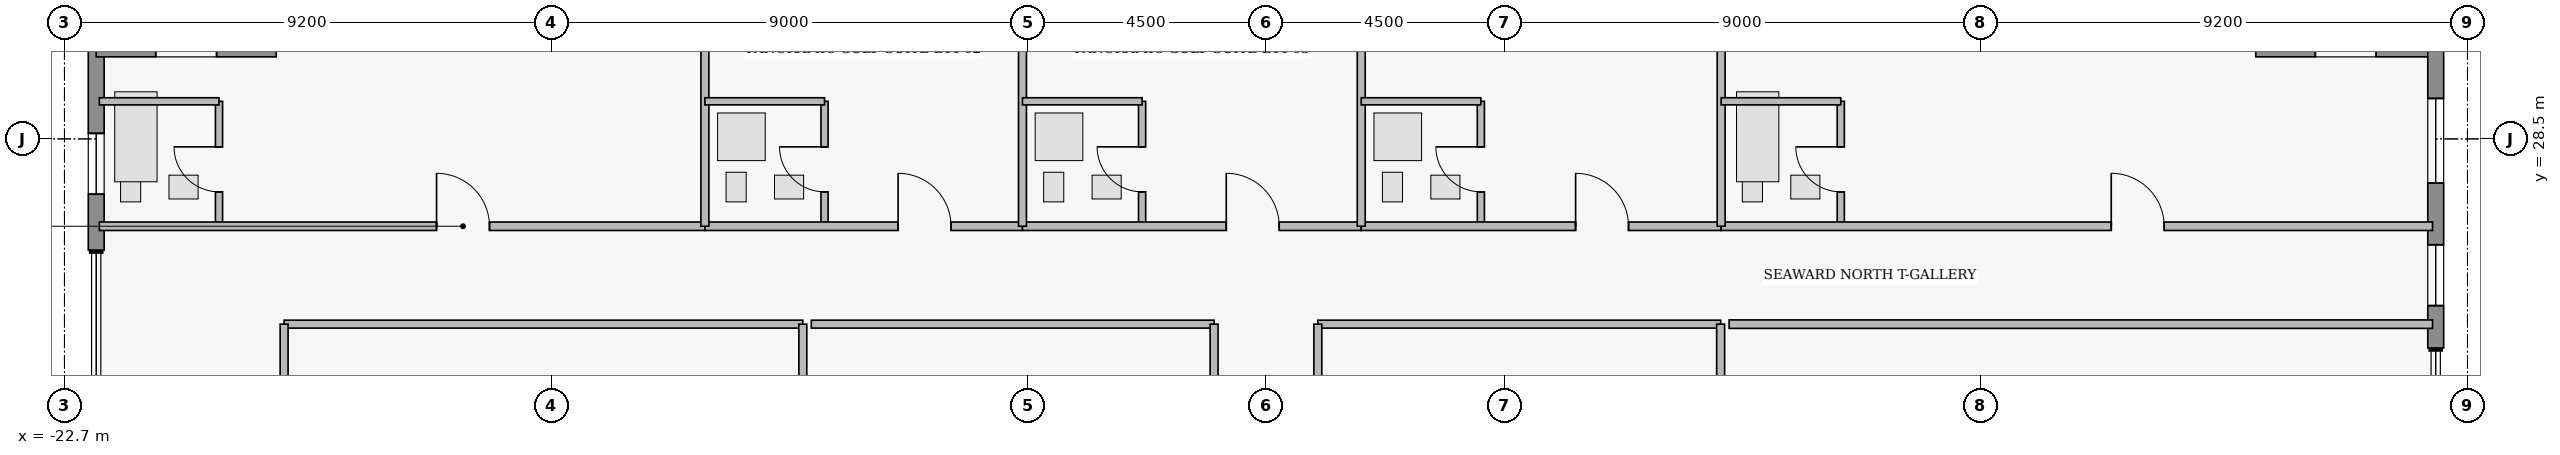
"""IFC4 building model, lengths in metres.
Left out: names, types, materials, properties, quantities, classifications, styles, units other than length and angle.
Written with IfcOpenShell. Run it as: python <this file> out.ifc"""

import sys

from ifc_helpers import new_model, si_unit, direction, frame, frame_2d, origin, place, context, subcontext, project, spatial, rectangle, extrude, element, fill, save


model = new_model("IFC4")
c1 = context("Model", 3, precision=1e-05, world=origin(), true_north=direction((0.0, 1.0)))
c2 = subcontext(c1, "Body", "Model", "MODEL_VIEW")
j1 = project(units=[si_unit("LENGTHUNIT", "METRE"), si_unit("PLANEANGLEUNIT", "RADIAN")], contexts=[c1])
p1 = place(None, origin())
s1 = spatial("IfcSite", under=j1, at=p1, CompositionType="ELEMENT")
p2 = place(p1, origin())
s2 = spatial("IfcBuilding", under=s1, at=p2, CompositionType="ELEMENT")
p3 = place(p2, frame((0.0, 0.0, 177.4)))
s3 = spatial("IfcBuildingStorey", under=s2, at=p3, CompositionType="ELEMENT", Elevation=177.4)
p4 = place(p3, frame((-22.1, 26.4, 0.0), z_axis=(0.0, 0.0, 1.0), x_axis=(0.0, 1.0, 0.0)))
e1 = element("IfcWall", 1, at=p4, inside=s3, PredefinedType="STANDARD", context=c2, shape_type="SweptSolid", body=[
    extrude(rectangle(XDim=3.8, YDim=0.3, at=frame_2d((1.9, 0.0))), origin(), (0.0, 0.0, 1.0), 3.53),
])
p5 = place(p4, frame((1.055, 0.0, 0.95)))
e2 = element("IfcOpeningElement", 2, at=p5, cuts=e1, PredefinedType="OPENING", context=c2, shape_type="SweptSolid", body=[
    extrude(rectangle(XDim=1.15, YDim=1.55, at=frame_2d((0.575, 0.775))), frame((0.0, 0.16, 0.0), z_axis=(0.0, -1.0, 0.0), x_axis=(1.0, 0.0, 0.0)), (0.0, 0.0, 1.0), 0.32),
])
p6 = place(p3, frame((-22.1, 30.2, 0.0), z_axis=(0.0, 0.0, 1.0), x_axis=(1.0, 0.0, 0.0)))
e3 = element("IfcWall", 3, at=p6, inside=s3, PredefinedType="STANDARD", context=c2, shape_type="SweptSolid", body=[
    extrude(rectangle(XDim=3.4, YDim=0.3, at=frame_2d((1.7, 0.0))), origin(), (0.0, 0.0, 1.0), 3.53),
])
p7 = place(p6, frame((1.125, 0.0, 1.25)))
e4 = element("IfcOpeningElement", 4, at=p7, cuts=e3, PredefinedType="OPENING", context=c2, shape_type="SweptSolid", body=[
    extrude(rectangle(XDim=1.15, YDim=1.55, at=frame_2d((0.575, 0.775))), frame((0.0, 0.16, 0.0), z_axis=(0.0, -1.0, 0.0), x_axis=(1.0, 0.0, 0.0)), (0.0, 0.0, 1.0), 0.32),
])
p8 = place(p3, frame((18.7, 30.2, 0.0), z_axis=(0.0, 0.0, 1.0), x_axis=(1.0, 0.0, 0.0)))
e5 = element("IfcWall", 5, at=p8, inside=s3, PredefinedType="STANDARD", context=c2, shape_type="SweptSolid", body=[
    extrude(rectangle(XDim=3.4, YDim=0.3, at=frame_2d((1.7, 0.0))), origin(), (0.0, 0.0, 1.0), 3.53),
])
p9 = place(p8, frame((1.125, 0.0, 1.25)))
e6 = element("IfcOpeningElement", 6, at=p9, cuts=e5, PredefinedType="OPENING", context=c2, shape_type="SweptSolid", body=[
    extrude(rectangle(XDim=1.15, YDim=1.55, at=frame_2d((0.575, 0.775))), frame((0.0, 0.16, 0.0), z_axis=(0.0, -1.0, 0.0), x_axis=(1.0, 0.0, 0.0)), (0.0, 0.0, 1.0), 0.32),
])
p10 = place(p3, frame((22.1, 30.2, 0.0), z_axis=(0.0, 0.0, 1.0), x_axis=(0.0, -1.0, 0.0)))
e7 = element("IfcWall", 7, at=p10, inside=s3, PredefinedType="STANDARD", context=c2, shape_type="SweptSolid", body=[
    extrude(rectangle(XDim=5.65, YDim=0.3, at=frame_2d((2.825, 0.0))), origin(), (0.0, 0.0, 1.0), 3.53),
])
p11 = place(p10, frame((0.935, 0.0, 0.85)))
e8 = element("IfcOpeningElement", 8, at=p11, cuts=e7, PredefinedType="OPENING", context=c2, shape_type="SweptSolid", body=[
    extrude(rectangle(XDim=1.6, YDim=1.8, at=frame_2d((0.8, 0.9))), frame((0.0, 0.16, 0.0), z_axis=(0.0, -1.0, 0.0), x_axis=(1.0, 0.0, 0.0)), (0.0, 0.0, 1.0), 0.32),
])
p12 = place(p10, frame((3.7, 0.0, 0.95)))
e9 = element("IfcOpeningElement", 9, at=p12, cuts=e7, PredefinedType="OPENING", context=c2, shape_type="SweptSolid", body=[
    extrude(rectangle(XDim=1.15, YDim=1.55, at=frame_2d((0.575, 0.775))), frame((0.0, 0.16, 0.0), z_axis=(0.0, -1.0, 0.0), x_axis=(1.0, 0.0, 0.0)), (0.0, 0.0, 1.0), 0.32),
])
p13 = place(p3, frame((-19.78, 26.85, 0.0), z_axis=(0.0, 0.0, 1.0), x_axis=(0.0, 1.0, 0.0)))
e10 = element("IfcWall", 10, at=p13, inside=s3, PredefinedType="PLUMBINGWALL", context=c2, shape_type="SweptSolid", body=[
    extrude(rectangle(XDim=2.36, YDim=0.135, at=frame_2d((1.18, 0.0))), origin(), (0.0, 0.0, 1.0), 3.53),
])
p14 = place(p13, frame((0.65, 0.0, 0.0)))
e11 = element("IfcOpeningElement", 11, at=p14, cuts=e10, PredefinedType="OPENING", context=c2, shape_type="SweptSolid", body=[
    extrude(rectangle(XDim=0.85, YDim=2.1, at=frame_2d((0.425, 1.05))), frame((0.0, 0.077, 0.0), z_axis=(0.0, -1.0, 0.0), x_axis=(1.0, 0.0, 0.0)), (0.0, 0.0, 1.0), 0.155),
])
p15 = place(p3, frame((-22.04, 26.85, 0.0), z_axis=(0.0, 0.0, 1.0), x_axis=(1.0, 0.0, 0.0)))
e12 = element("IfcWall", 12, at=p15, inside=s3, PredefinedType="PARTITIONING", context=c2, shape_type="SweptSolid", body=[
    extrude(rectangle(XDim=11.44, YDim=0.16, at=frame_2d((5.72, 0.0))), origin(), (0.0, 0.0, 1.0), 3.53),
])
p16 = place(p15, frame((6.37, 0.0, 0.0)))
e13 = element("IfcOpeningElement", 13, at=p16, cuts=e12, PredefinedType="OPENING", context=c2, shape_type="SweptSolid", body=[
    extrude(rectangle(XDim=1.0, YDim=2.15, at=frame_2d((0.5, 1.075))), frame((0.0, 0.09, 0.0), z_axis=(0.0, -1.0, 0.0), x_axis=(1.0, 0.0, 0.0)), (0.0, 0.0, 1.0), 0.18),
])
p17 = place(p3, frame((-8.34, 26.85, 0.0), z_axis=(0.0, 0.0, 1.0), x_axis=(0.0, 1.0, 0.0)))
e14 = element("IfcWall", 14, at=p17, inside=s3, PredefinedType="PLUMBINGWALL", context=c2, shape_type="SweptSolid", body=[
    extrude(rectangle(XDim=2.36, YDim=0.135, at=frame_2d((1.18, 0.0))), origin(), (0.0, 0.0, 1.0), 3.53),
])
p18 = place(p17, frame((0.65, 0.0, 0.0)))
e15 = element("IfcOpeningElement", 15, at=p18, cuts=e14, PredefinedType="OPENING", context=c2, shape_type="SweptSolid", body=[
    extrude(rectangle(XDim=0.85, YDim=2.1, at=frame_2d((0.425, 1.05))), frame((0.0, 0.077, 0.0), z_axis=(0.0, -1.0, 0.0), x_axis=(1.0, 0.0, 0.0)), (0.0, 0.0, 1.0), 0.155),
])
p19 = place(p3, frame((-10.6, 26.85, 0.0), z_axis=(0.0, 0.0, 1.0), x_axis=(1.0, 0.0, 0.0)))
e16 = element("IfcWall", 16, at=p19, inside=s3, PredefinedType="PARTITIONING", context=c2, shape_type="SweptSolid", body=[
    extrude(rectangle(XDim=6.0, YDim=0.16, at=frame_2d((3.0, 0.0))), origin(), (0.0, 0.0, 1.0), 3.53),
])
p20 = place(p19, frame((3.65, 0.0, 0.0)))
e17 = element("IfcOpeningElement", 17, at=p20, cuts=e16, PredefinedType="OPENING", context=c2, shape_type="SweptSolid", body=[
    extrude(rectangle(XDim=1.0, YDim=2.15, at=frame_2d((0.5, 1.075))), frame((0.0, 0.09, 0.0), z_axis=(0.0, -1.0, 0.0), x_axis=(1.0, 0.0, 0.0)), (0.0, 0.0, 1.0), 0.18),
])
p21 = place(p3, frame((-2.34, 26.85, 0.0), z_axis=(0.0, 0.0, 1.0), x_axis=(0.0, 1.0, 0.0)))
e18 = element("IfcWall", 18, at=p21, inside=s3, PredefinedType="PLUMBINGWALL", context=c2, shape_type="SweptSolid", body=[
    extrude(rectangle(XDim=2.36, YDim=0.135, at=frame_2d((1.18, 0.0))), origin(), (0.0, 0.0, 1.0), 3.53),
])
p22 = place(p21, frame((0.65, 0.0, 0.0)))
e19 = element("IfcOpeningElement", 19, at=p22, cuts=e18, PredefinedType="OPENING", context=c2, shape_type="SweptSolid", body=[
    extrude(rectangle(XDim=0.85, YDim=2.1, at=frame_2d((0.425, 1.05))), frame((0.0, 0.077, 0.0), z_axis=(0.0, -1.0, 0.0), x_axis=(1.0, 0.0, 0.0)), (0.0, 0.0, 1.0), 0.155),
])
p23 = place(p3, frame((-4.6, 26.85, 0.0), z_axis=(0.0, 0.0, 1.0), x_axis=(1.0, 0.0, 0.0)))
e20 = element("IfcWall", 20, at=p23, inside=s3, PredefinedType="PARTITIONING", context=c2, shape_type="SweptSolid", body=[
    extrude(rectangle(XDim=6.4, YDim=0.16, at=frame_2d((3.2, 0.0))), origin(), (0.0, 0.0, 1.0), 3.53),
])
p24 = place(p23, frame((3.85, 0.0, 0.0)))
e21 = element("IfcOpeningElement", 21, at=p24, cuts=e20, PredefinedType="OPENING", context=c2, shape_type="SweptSolid", body=[
    extrude(rectangle(XDim=1.0, YDim=2.15, at=frame_2d((0.5, 1.075))), frame((0.0, 0.09, 0.0), z_axis=(0.0, -1.0, 0.0), x_axis=(1.0, 0.0, 0.0)), (0.0, 0.0, 1.0), 0.18),
])
p25 = place(p3, frame((4.06, 26.85, 0.0), z_axis=(0.0, 0.0, 1.0), x_axis=(0.0, 1.0, 0.0)))
e22 = element("IfcWall", 22, at=p25, inside=s3, PredefinedType="PLUMBINGWALL", context=c2, shape_type="SweptSolid", body=[
    extrude(rectangle(XDim=2.36, YDim=0.135, at=frame_2d((1.18, 0.0))), origin(), (0.0, 0.0, 1.0), 3.53),
])
p26 = place(p25, frame((0.65, 0.0, 0.0)))
e23 = element("IfcOpeningElement", 23, at=p26, cuts=e22, PredefinedType="OPENING", context=c2, shape_type="SweptSolid", body=[
    extrude(rectangle(XDim=0.85, YDim=2.1, at=frame_2d((0.425, 1.05))), frame((0.0, 0.077, 0.0), z_axis=(0.0, -1.0, 0.0), x_axis=(1.0, 0.0, 0.0)), (0.0, 0.0, 1.0), 0.155),
])
p27 = place(p3, frame((1.8, 26.85, 0.0), z_axis=(0.0, 0.0, 1.0), x_axis=(1.0, 0.0, 0.0)))
e24 = element("IfcWall", 24, at=p27, inside=s3, PredefinedType="PARTITIONING", context=c2, shape_type="SweptSolid", body=[
    extrude(rectangle(XDim=6.8, YDim=0.16, at=frame_2d((3.4, 0.0))), origin(), (0.0, 0.0, 1.0), 3.53),
])
p28 = place(p27, frame((4.05, 0.0, 0.0)))
e25 = element("IfcOpeningElement", 25, at=p28, cuts=e24, PredefinedType="OPENING", context=c2, shape_type="SweptSolid", body=[
    extrude(rectangle(XDim=1.0, YDim=2.15, at=frame_2d((0.5, 1.075))), frame((0.0, 0.09, 0.0), z_axis=(0.0, -1.0, 0.0), x_axis=(1.0, 0.0, 0.0)), (0.0, 0.0, 1.0), 0.18),
])
p29 = place(p3, frame((10.86, 26.85, 0.0), z_axis=(0.0, 0.0, 1.0), x_axis=(0.0, 1.0, 0.0)))
e26 = element("IfcWall", 26, at=p29, inside=s3, PredefinedType="PLUMBINGWALL", context=c2, shape_type="SweptSolid", body=[
    extrude(rectangle(XDim=2.36, YDim=0.135, at=frame_2d((1.18, 0.0))), origin(), (0.0, 0.0, 1.0), 3.53),
])
p30 = place(p29, frame((0.65, 0.0, 0.0)))
e27 = element("IfcOpeningElement", 27, at=p30, cuts=e26, PredefinedType="OPENING", context=c2, shape_type="SweptSolid", body=[
    extrude(rectangle(XDim=0.85, YDim=2.1, at=frame_2d((0.425, 1.05))), frame((0.0, 0.077, 0.0), z_axis=(0.0, -1.0, 0.0), x_axis=(1.0, 0.0, 0.0)), (0.0, 0.0, 1.0), 0.155),
])
p31 = place(p3, frame((8.6, 26.85, 0.0), z_axis=(0.0, 0.0, 1.0), x_axis=(1.0, 0.0, 0.0)))
e28 = element("IfcWall", 28, at=p31, inside=s3, PredefinedType="PARTITIONING", context=c2, shape_type="SweptSolid", body=[
    extrude(rectangle(XDim=13.44, YDim=0.16, at=frame_2d((6.72, 0.0))), origin(), (0.0, 0.0, 1.0), 3.53),
])
p32 = place(p31, frame((7.37, 0.0, 0.0)))
e29 = element("IfcOpeningElement", 29, at=p32, cuts=e28, PredefinedType="OPENING", context=c2, shape_type="SweptSolid", body=[
    extrude(rectangle(XDim=1.0, YDim=2.15, at=frame_2d((0.5, 1.075))), frame((0.0, 0.09, 0.0), z_axis=(0.0, -1.0, 0.0), x_axis=(1.0, 0.0, 0.0)), (0.0, 0.0, 1.0), 0.18),
])
p33 = place(p3, frame((-22.04, 29.21, 0.0), z_axis=(0.0, 0.0, 1.0), x_axis=(1.0, 0.0, 0.0)))
e30 = element("IfcWall", 30, at=p33, inside=s3, PredefinedType="PLUMBINGWALL", context=c2, shape_type="SweptSolid", body=[
    extrude(rectangle(XDim=2.26, YDim=0.135, at=frame_2d((1.13, 0.0))), origin(), (0.0, 0.0, 1.0), 3.53),
])
p34 = place(p3, frame((-10.6, 26.85, 0.0), z_axis=(0.0, 0.0, 1.0), x_axis=(0.0, 1.0, 0.0)))
e31 = element("IfcWall", 31, at=p34, inside=s3, PredefinedType="PARTITIONING", context=c2, shape_type="SweptSolid", body=[
    extrude(rectangle(XDim=6.67, YDim=0.15, at=frame_2d((3.335, 0.0))), origin(), (0.0, 0.0, 1.0), 3.53),
])
p35 = place(p3, frame((-10.6, 29.21, 0.0), z_axis=(0.0, 0.0, 1.0), x_axis=(1.0, 0.0, 0.0)))
e32 = element("IfcWall", 32, at=p35, inside=s3, PredefinedType="PLUMBINGWALL", context=c2, shape_type="SweptSolid", body=[
    extrude(rectangle(XDim=2.26, YDim=0.135, at=frame_2d((1.13, 0.0))), origin(), (0.0, 0.0, 1.0), 3.53),
])
p36 = place(p3, frame((-4.6, 26.85, 0.0), z_axis=(0.0, 0.0, 1.0), x_axis=(0.0, 1.0, 0.0)))
e33 = element("IfcWall", 33, at=p36, inside=s3, PredefinedType="PARTITIONING", context=c2, shape_type="SweptSolid", body=[
    extrude(rectangle(XDim=6.67, YDim=0.15, at=frame_2d((3.335, 0.0))), origin(), (0.0, 0.0, 1.0), 2.519),
])
p37 = place(p3, frame((-4.6, 29.21, 0.0), z_axis=(0.0, 0.0, 1.0), x_axis=(1.0, 0.0, 0.0)))
e34 = element("IfcWall", 34, at=p37, inside=s3, PredefinedType="PLUMBINGWALL", context=c2, shape_type="SweptSolid", body=[
    extrude(rectangle(XDim=2.26, YDim=0.135, at=frame_2d((1.13, 0.0))), origin(), (0.0, 0.0, 1.0), 3.53),
])
p38 = place(p3, frame((1.8, 26.85, 0.0), z_axis=(0.0, 0.0, 1.0), x_axis=(0.0, 1.0, 0.0)))
e35 = element("IfcWall", 35, at=p38, inside=s3, PredefinedType="PARTITIONING", context=c2, shape_type="SweptSolid", body=[
    extrude(rectangle(XDim=6.67, YDim=0.15, at=frame_2d((3.335, 0.0))), origin(), (0.0, 0.0, 1.0), 3.53),
])
p39 = place(p3, frame((1.8, 29.21, 0.0), z_axis=(0.0, 0.0, 1.0), x_axis=(1.0, 0.0, 0.0)))
e36 = element("IfcWall", 36, at=p39, inside=s3, PredefinedType="PLUMBINGWALL", context=c2, shape_type="SweptSolid", body=[
    extrude(rectangle(XDim=2.26, YDim=0.135, at=frame_2d((1.13, 0.0))), origin(), (0.0, 0.0, 1.0), 3.53),
])
p40 = place(p3, frame((8.6, 26.85, 0.0), z_axis=(0.0, 0.0, 1.0), x_axis=(0.0, 1.0, 0.0)))
e37 = element("IfcWall", 37, at=p40, inside=s3, PredefinedType="PARTITIONING", context=c2, shape_type="SweptSolid", body=[
    extrude(rectangle(XDim=6.67, YDim=0.15, at=frame_2d((3.335, 0.0))), origin(), (0.0, 0.0, 1.0), 3.53),
])
p41 = place(p3, frame((8.6, 29.21, 0.0), z_axis=(0.0, 0.0, 1.0), x_axis=(1.0, 0.0, 0.0)))
e38 = element("IfcWall", 38, at=p41, inside=s3, PredefinedType="PLUMBINGWALL", context=c2, shape_type="SweptSolid", body=[
    extrude(rectangle(XDim=2.26, YDim=0.135, at=frame_2d((1.13, 0.0))), origin(), (0.0, 0.0, 1.0), 3.53),
])
p42 = place(p3, frame((-18.55, 25.0, 0.0), z_axis=(0.0, 0.0, 1.0), x_axis=(1.0, 0.0, 0.0)))
e39 = element("IfcWall", 39, at=p42, inside=s3, PredefinedType="PARTITIONING", context=c2, shape_type="SweptSolid", body=[
    extrude(rectangle(XDim=9.8, YDim=0.15, at=frame_2d((4.9, 0.0))), origin(), (0.0, 0.0, 1.0), 3.124),
])
for number, where, z_axis, x_axis in (
    (40, (-18.55, 16.7, 0.0), (0.0, 0.0, 1.0), (0.0, 1.0, 0.0)),
    (41, (-8.75, 16.7, 0.0), (0.0, 0.0, 1.0), (0.0, 1.0, 0.0)),
):
    element("IfcWall", number, at=place(p3, frame(where, z_axis=z_axis, x_axis=x_axis)), inside=s3, PredefinedType="PARTITIONING", context=c2, shape_type="SweptSolid", body=[
        extrude(rectangle(XDim=8.3, YDim=0.15, at=frame_2d((4.15, 0.0))), origin(), (0.0, 0.0, 1.0), 3.53),
    ])
p43 = place(p3, frame((-8.59, 25.0, 0.0), z_axis=(0.0, 0.0, 1.0), x_axis=(1.0, 0.0, 0.0)))
e42 = element("IfcWall", 42, at=p43, inside=s3, PredefinedType="PARTITIONING", context=c2, shape_type="SweptSolid", body=[
    extrude(rectangle(XDim=7.61, YDim=0.15, at=frame_2d((3.805, 0.0))), origin(), (0.0, 0.0, 1.0), 3.124),
])
p44 = place(p3, frame((-0.98, 16.7, 0.0), z_axis=(0.0, 0.0, 1.0), x_axis=(0.0, 1.0, 0.0)))
e43 = element("IfcWall", 43, at=p44, inside=s3, PredefinedType="PARTITIONING", context=c2, shape_type="SweptSolid", body=[
    extrude(rectangle(XDim=8.3, YDim=0.15, at=frame_2d((4.15, 0.0))), origin(), (0.0, 0.0, 1.0), 3.53),
])
p45 = place(p3, frame((0.98, 25.0, 0.0), z_axis=(0.0, 0.0, 1.0), x_axis=(1.0, 0.0, 0.0)))
e44 = element("IfcWall", 44, at=p45, inside=s3, PredefinedType="PARTITIONING", context=c2, shape_type="SweptSolid", body=[
    extrude(rectangle(XDim=7.61, YDim=0.15, at=frame_2d((3.805, 0.0))), origin(), (0.0, 0.0, 1.0), 3.124),
])
for number, where, z_axis, x_axis in (
    (45, (0.98, 16.7, 0.0), (0.0, 0.0, 1.0), (0.0, 1.0, 0.0)),
    (46, (8.59, 16.7, 0.0), (0.0, 0.0, 1.0), (0.0, 1.0, 0.0)),
):
    element("IfcWall", number, at=place(p3, frame(where, z_axis=z_axis, x_axis=x_axis)), inside=s3, PredefinedType="PARTITIONING", context=c2, shape_type="SweptSolid", body=[
        extrude(rectangle(XDim=8.3, YDim=0.15, at=frame_2d((4.15, 0.0))), origin(), (0.0, 0.0, 1.0), 3.53),
    ])
p46 = place(p3, frame((8.75, 25.0, 0.0), z_axis=(0.0, 0.0, 1.0), x_axis=(1.0, 0.0, 0.0)))
e47 = element("IfcWall", 47, at=p46, inside=s3, PredefinedType="PARTITIONING", context=c2, shape_type="SweptSolid", body=[
    extrude(rectangle(XDim=13.29, YDim=0.16, at=frame_2d((6.645, 0.0))), origin(), (0.0, 0.0, 1.0), 3.124),
])
p47 = place(p5, origin())
e48 = element("IfcWindow", 48, at=p47, inside=s3, PartitioningType="SINGLE_PANEL", PredefinedType="WINDOW", context=c2, shape_type="SweptSolid", body=[
    extrude(rectangle(XDim=1.15, YDim=1.55, at=frame_2d((0.575, 0.775))), frame((0.0, 0.03, 0.0), z_axis=(0.0, -1.0, 0.0), x_axis=(1.0, 0.0, 0.0)), (0.0, 0.0, 1.0), 0.06),
])
fill(e2, e48)
p48 = place(p11, origin())
e49 = element("IfcWindow", 49, at=p48, inside=s3, PartitioningType="SINGLE_PANEL", PredefinedType="WINDOW", context=c2, shape_type="SweptSolid", body=[
    extrude(rectangle(XDim=1.6, YDim=1.8, at=frame_2d((0.8, 0.9))), frame((0.0, 0.03, 0.0), z_axis=(0.0, -1.0, 0.0), x_axis=(1.0, 0.0, 0.0)), (0.0, 0.0, 1.0), 0.06),
])
fill(e8, e49)
p49 = place(p12, origin())
e50 = element("IfcWindow", 50, at=p49, inside=s3, PartitioningType="SINGLE_PANEL", PredefinedType="WINDOW", context=c2, shape_type="SweptSolid", body=[
    extrude(rectangle(XDim=1.15, YDim=1.55, at=frame_2d((0.575, 0.775))), frame((0.0, 0.03, 0.0), z_axis=(0.0, -1.0, 0.0), x_axis=(1.0, 0.0, 0.0)), (0.0, 0.0, 1.0), 0.06),
])
fill(e9, e50)
p50 = place(p14, origin())
e51 = element("IfcDoor", 51, at=p50, inside=s3, OperationType="SINGLE_SWING_RIGHT", PredefinedType="DOOR", context=c2, shape_type="SweptSolid", body=[
    extrude(rectangle(XDim=0.85, YDim=2.1, at=frame_2d((0.425, 1.05))), frame((0.0, 0.025, 0.0), z_axis=(0.0, -1.0, 0.0), x_axis=(1.0, 0.0, 0.0)), (0.0, 0.0, 1.0), 0.05),
])
fill(e11, e51)
p51 = place(p16, origin())
e52 = element("IfcDoor", 52, at=p51, inside=s3, OperationType="SINGLE_SWING_LEFT", PredefinedType="DOOR", context=c2, shape_type="SweptSolid", body=[
    extrude(rectangle(XDim=1.0, YDim=2.15, at=frame_2d((0.5, 1.075))), frame((0.0, 0.025, 0.0), z_axis=(0.0, -1.0, 0.0), x_axis=(1.0, 0.0, 0.0)), (0.0, 0.0, 1.0), 0.05),
])
fill(e13, e52)
p52 = place(p18, origin())
e53 = element("IfcDoor", 53, at=p52, inside=s3, OperationType="SINGLE_SWING_RIGHT", PredefinedType="DOOR", context=c2, shape_type="SweptSolid", body=[
    extrude(rectangle(XDim=0.85, YDim=2.1, at=frame_2d((0.425, 1.05))), frame((0.0, 0.025, 0.0), z_axis=(0.0, -1.0, 0.0), x_axis=(1.0, 0.0, 0.0)), (0.0, 0.0, 1.0), 0.05),
])
fill(e15, e53)
p53 = place(p20, origin())
e54 = element("IfcDoor", 54, at=p53, inside=s3, OperationType="SINGLE_SWING_LEFT", PredefinedType="DOOR", context=c2, shape_type="SweptSolid", body=[
    extrude(rectangle(XDim=1.0, YDim=2.15, at=frame_2d((0.5, 1.075))), frame((0.0, 0.025, 0.0), z_axis=(0.0, -1.0, 0.0), x_axis=(1.0, 0.0, 0.0)), (0.0, 0.0, 1.0), 0.05),
])
fill(e17, e54)
p54 = place(p22, origin())
e55 = element("IfcDoor", 55, at=p54, inside=s3, OperationType="SINGLE_SWING_RIGHT", PredefinedType="DOOR", context=c2, shape_type="SweptSolid", body=[
    extrude(rectangle(XDim=0.85, YDim=2.1, at=frame_2d((0.425, 1.05))), frame((0.0, 0.025, 0.0), z_axis=(0.0, -1.0, 0.0), x_axis=(1.0, 0.0, 0.0)), (0.0, 0.0, 1.0), 0.05),
])
fill(e19, e55)
p55 = place(p24, origin())
e56 = element("IfcDoor", 56, at=p55, inside=s3, OperationType="SINGLE_SWING_LEFT", PredefinedType="DOOR", context=c2, shape_type="SweptSolid", body=[
    extrude(rectangle(XDim=1.0, YDim=2.15, at=frame_2d((0.5, 1.075))), frame((0.0, 0.025, 0.0), z_axis=(0.0, -1.0, 0.0), x_axis=(1.0, 0.0, 0.0)), (0.0, 0.0, 1.0), 0.05),
])
fill(e21, e56)
p56 = place(p26, origin())
e57 = element("IfcDoor", 57, at=p56, inside=s3, OperationType="SINGLE_SWING_RIGHT", PredefinedType="DOOR", context=c2, shape_type="SweptSolid", body=[
    extrude(rectangle(XDim=0.85, YDim=2.1, at=frame_2d((0.425, 1.05))), frame((0.0, 0.025, 0.0), z_axis=(0.0, -1.0, 0.0), x_axis=(1.0, 0.0, 0.0)), (0.0, 0.0, 1.0), 0.05),
])
fill(e23, e57)
p57 = place(p28, origin())
e58 = element("IfcDoor", 58, at=p57, inside=s3, OperationType="SINGLE_SWING_LEFT", PredefinedType="DOOR", context=c2, shape_type="SweptSolid", body=[
    extrude(rectangle(XDim=1.0, YDim=2.15, at=frame_2d((0.5, 1.075))), frame((0.0, 0.025, 0.0), z_axis=(0.0, -1.0, 0.0), x_axis=(1.0, 0.0, 0.0)), (0.0, 0.0, 1.0), 0.05),
])
fill(e25, e58)
p58 = place(p30, origin())
e59 = element("IfcDoor", 59, at=p58, inside=s3, OperationType="SINGLE_SWING_RIGHT", PredefinedType="DOOR", context=c2, shape_type="SweptSolid", body=[
    extrude(rectangle(XDim=0.85, YDim=2.1, at=frame_2d((0.425, 1.05))), frame((0.0, 0.025, 0.0), z_axis=(0.0, -1.0, 0.0), x_axis=(1.0, 0.0, 0.0)), (0.0, 0.0, 1.0), 0.05),
])
fill(e27, e59)
p59 = place(p32, origin())
e60 = element("IfcDoor", 60, at=p59, inside=s3, OperationType="SINGLE_SWING_LEFT", PredefinedType="DOOR", context=c2, shape_type="SweptSolid", body=[
    extrude(rectangle(XDim=1.0, YDim=2.15, at=frame_2d((0.5, 1.075))), frame((0.0, 0.025, 0.0), z_axis=(0.0, -1.0, 0.0), x_axis=(1.0, 0.0, 0.0)), (0.0, 0.0, 1.0), 0.05),
])
fill(e29, e60)
save(model, sys.argv[1])
